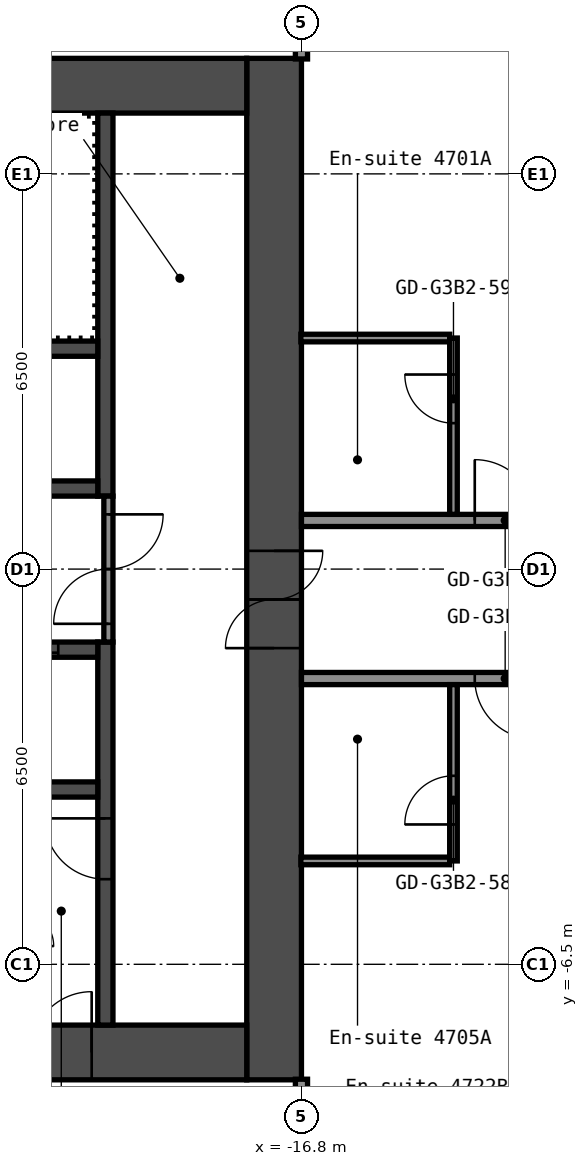
"""IFC4 building model, lengths in metres.
Left out: names, types, materials, properties, quantities, classifications, styles, units other than length and angle.
Written with IfcOpenShell. Run it as: python <this file> out.ifc"""

import sys

from ifc_helpers import new_model, si_unit, direction, frame, frame_2d, origin, place, context, subcontext, project, spatial, rectangle, extrude, element, fill, save


model = new_model("IFC4")
c1 = context("Model", 3, precision=1e-05, world=origin(), true_north=direction((0.0, 1.0)))
c2 = subcontext(c1, "Body", "Model", "MODEL_VIEW")
j1 = project(units=[si_unit("LENGTHUNIT", "METRE"), si_unit("PLANEANGLEUNIT", "RADIAN")], contexts=[c1])
p1 = place(None, origin())
s1 = spatial("IfcSite", under=j1, at=p1, CompositionType="ELEMENT")
p2 = place(p1, origin())
s2 = spatial("IfcBuilding", under=s1, at=p2, CompositionType="ELEMENT")
p3 = place(p2, frame((0.0, 0.0, 166.2)))
s3 = spatial("IfcBuildingStorey", under=s2, at=p3, CompositionType="ELEMENT", Elevation=166.2)
p4 = place(p3, frame((-17.25, -8.4, 0.0), z_axis=(0.0, 0.0, 1.0), x_axis=(0.0, 1.0, 0.0)))
e1 = element("IfcWall", 1, at=p4, inside=s3, PredefinedType="SHEAR", context=c2, shape_type="SweptSolid", body=[
    extrude(rectangle(XDim=16.8, YDim=0.9, at=frame_2d((8.4, 0.0))), origin(), (0.0, 0.0, 1.0), 2.75),
])
p5 = place(p4, frame((7.1, 0.0, 0.0)))
e2 = element("IfcOpeningElement", 2, at=p5, cuts=e1, PredefinedType="OPENING", context=c2, shape_type="SweptSolid", body=[
    extrude(rectangle(XDim=1.6, YDim=2.1, at=frame_2d((0.8, 1.05))), frame((0.0, 0.46, 0.0), z_axis=(0.0, -1.0, 0.0), x_axis=(1.0, 0.0, 0.0)), (0.0, 0.0, 1.0), 0.92),
])
p6 = place(p3, frame((-32.7, 7.95, 0.0), z_axis=(0.0, 0.0, 1.0), x_axis=(1.0, 0.0, 0.0)))
e3 = element("IfcWall", 3, at=p6, inside=s3, PredefinedType="SHEAR", context=c2, shape_type="SweptSolid", body=[
    extrude(rectangle(XDim=15.0, YDim=0.9, at=frame_2d((7.5, 0.0))), origin(), (0.0, 0.0, 1.0), 2.75),
])
p7 = place(p6, frame((3.4, 0.0, 0.0)))
e4 = element("IfcOpeningElement", 4, at=p7, cuts=e3, PredefinedType="OPENING", context=c2, shape_type="SweptSolid", body=[
    extrude(rectangle(XDim=1.2, YDim=2.1, at=frame_2d((0.6, 1.05))), frame((0.0, 0.46, 0.0), z_axis=(0.0, -1.0, 0.0), x_axis=(1.0, 0.0, 0.0)), (0.0, 0.0, 1.0), 0.92),
])
p8 = place(p6, frame((0.75, 0.0, 0.0)))
e5 = element("IfcOpeningElement", 5, at=p8, cuts=e3, PredefinedType="OPENING", context=c2, shape_type="SweptSolid", body=[
    extrude(rectangle(XDim=0.9, YDim=2.1, at=frame_2d((0.45, 1.05))), frame((0.0, 0.46, 0.0), z_axis=(0.0, -1.0, 0.0), x_axis=(1.0, 0.0, 0.0)), (0.0, 0.0, 1.0), 0.92),
])
p9 = place(p3, frame((-32.7, -7.95, 0.0), z_axis=(0.0, 0.0, 1.0), x_axis=(1.0, 0.0, 0.0)))
e6 = element("IfcWall", 6, at=p9, inside=s3, PredefinedType="SHEAR", context=c2, shape_type="SweptSolid", body=[
    extrude(rectangle(XDim=15.0, YDim=0.9, at=frame_2d((7.5, 0.0))), origin(), (0.0, 0.0, 1.0), 2.75),
])
p10 = place(p9, frame((11.45, 0.0, 0.0)))
e7 = element("IfcOpeningElement", 7, at=p10, cuts=e6, PredefinedType="OPENING", context=c2, shape_type="SweptSolid", body=[
    extrude(rectangle(XDim=1.0, YDim=2.1, at=frame_2d((0.5, 1.05))), frame((0.0, 0.46, 0.0), z_axis=(0.0, -1.0, 0.0), x_axis=(1.0, 0.0, 0.0)), (0.0, 0.0, 1.0), 0.92),
])
p11 = place(p3, frame((-20.025, 1.2, 0.0), z_axis=(0.0, 0.0, 1.0), x_axis=(0.0, 1.0, 0.0)))
e8 = element("IfcWall", 8, at=p11, inside=s3, PredefinedType="SHEAR", context=c2, shape_type="SweptSolid", body=[
    extrude(rectangle(XDim=6.3, YDim=0.25, at=frame_2d((3.15, 0.0))), origin(), (0.0, 0.0, 1.0), 2.75),
])
p12 = place(p3, frame((-20.025, -7.5, 0.0), z_axis=(0.0, 0.0, 1.0), x_axis=(0.0, 1.0, 0.0)))
e9 = element("IfcWall", 9, at=p12, inside=s3, PredefinedType="SHEAR", context=c2, shape_type="SweptSolid", body=[
    extrude(rectangle(XDim=6.3, YDim=0.25, at=frame_2d((3.15, 0.0))), origin(), (0.0, 0.0, 1.0), 2.75),
])
p13 = place(p12, frame((2.4, 0.0, 0.0)))
e10 = element("IfcOpeningElement", 10, at=p13, cuts=e9, PredefinedType="OPENING", context=c2, shape_type="SweptSolid", body=[
    extrude(rectangle(XDim=1.0, YDim=2.1, at=frame_2d((0.5, 1.05))), frame((0.0, 0.135, 0.0), z_axis=(0.0, -1.0, 0.0), x_axis=(1.0, 0.0, 0.0)), (0.0, 0.0, 1.0), 0.27),
])
p14 = place(p3, frame((-27.65, 1.325, 0.0), z_axis=(0.0, 0.0, 1.0), x_axis=(1.0, 0.0, 0.0)))
e11 = element("IfcWall", 11, at=p14, inside=s3, PredefinedType="SHEAR", context=c2, shape_type="SweptSolid", body=[
    extrude(rectangle(XDim=7.5, YDim=0.25, at=frame_2d((3.75, 0.0))), origin(), (0.0, 0.0, 1.0), 2.75),
])
p15 = place(p14, frame((4.363, 0.0, 0.0)))
e12 = element("IfcOpeningElement", 12, at=p15, cuts=e11, PredefinedType="OPENING", context=c2, shape_type="SweptSolid", body=[
    extrude(rectangle(XDim=0.9, YDim=2.1, at=frame_2d((0.45, 1.05))), frame((0.0, 0.135, 0.0), z_axis=(0.0, -1.0, 0.0), x_axis=(1.0, 0.0, 0.0)), (0.0, 0.0, 1.0), 0.27),
])
p16 = place(p14, frame((0.663, 0.0, 0.0)))
e13 = element("IfcOpeningElement", 13, at=p16, cuts=e11, PredefinedType="OPENING", context=c2, shape_type="SweptSolid", body=[
    extrude(rectangle(XDim=0.9, YDim=2.1, at=frame_2d((0.45, 1.05))), frame((0.0, 0.135, 0.0), z_axis=(0.0, -1.0, 0.0), x_axis=(1.0, 0.0, 0.0)), (0.0, 0.0, 1.0), 0.27),
])
p17 = place(p3, frame((-27.65, 3.625, 0.0), z_axis=(0.0, 0.0, 1.0), x_axis=(1.0, 0.0, 0.0)))
e14 = element("IfcWall", 14, at=p17, inside=s3, PredefinedType="SHEAR", context=c2, shape_type="SweptSolid", body=[
    extrude(rectangle(XDim=7.5, YDim=0.25, at=frame_2d((3.75, 0.0))), origin(), (0.0, 0.0, 1.0), 2.75),
])
p18 = place(p3, frame((-27.65, -1.325, 0.0), z_axis=(0.0, 0.0, 1.0), x_axis=(1.0, 0.0, 0.0)))
e15 = element("IfcWall", 15, at=p18, inside=s3, PredefinedType="SHEAR", context=c2, shape_type="SweptSolid", body=[
    extrude(rectangle(XDim=7.5, YDim=0.25, at=frame_2d((3.75, 0.0))), origin(), (0.0, 0.0, 1.0), 2.75),
])
p19 = place(p18, frame((5.75, 0.0, 0.0)))
e16 = element("IfcOpeningElement", 16, at=p19, cuts=e15, PredefinedType="OPENING", context=c2, shape_type="SweptSolid", body=[
    extrude(rectangle(XDim=1.1, YDim=2.1, at=frame_2d((0.55, 1.05))), frame((0.0, 0.135, 0.0), z_axis=(0.0, -1.0, 0.0), x_axis=(1.0, 0.0, 0.0)), (0.0, 0.0, 1.0), 0.27),
])
p20 = place(p18, frame((3.35, 0.0, 0.0)))
e17 = element("IfcOpeningElement", 17, at=p20, cuts=e15, PredefinedType="OPENING", context=c2, shape_type="SweptSolid", body=[
    extrude(rectangle(XDim=1.1, YDim=2.1, at=frame_2d((0.55, 1.05))), frame((0.0, 0.135, 0.0), z_axis=(0.0, -1.0, 0.0), x_axis=(1.0, 0.0, 0.0)), (0.0, 0.0, 1.0), 0.27),
])
p21 = place(p18, frame((0.95, 0.0, 0.0)))
e18 = element("IfcOpeningElement", 18, at=p21, cuts=e15, PredefinedType="OPENING", context=c2, shape_type="SweptSolid", body=[
    extrude(rectangle(XDim=1.1, YDim=2.1, at=frame_2d((0.55, 1.05))), frame((0.0, 0.135, 0.0), z_axis=(0.0, -1.0, 0.0), x_axis=(1.0, 0.0, 0.0)), (0.0, 0.0, 1.0), 0.27),
])
p22 = place(p3, frame((-27.65, -3.625, 0.0), z_axis=(0.0, 0.0, 1.0), x_axis=(1.0, 0.0, 0.0)))
e19 = element("IfcWall", 19, at=p22, inside=s3, PredefinedType="SHEAR", context=c2, shape_type="SweptSolid", body=[
    extrude(rectangle(XDim=7.5, YDim=0.25, at=frame_2d((3.75, 0.0))), origin(), (0.0, 0.0, 1.0), 2.75),
])
p23 = place(p3, frame((-19.975, -1.2, 0.0), z_axis=(0.0, 0.0, 1.0), x_axis=(0.0, 1.0, 0.0)))
e20 = element("IfcWall", 20, at=p23, inside=s3, PredefinedType="PARTITIONING", context=c2, shape_type="SweptSolid", body=[
    extrude(rectangle(XDim=2.4, YDim=0.15, at=frame_2d((1.2, 0.0))), origin(), (0.0, 0.0, 1.0), 2.75),
])
p24 = place(p23, frame((0.3, 0.0, 0.0)))
e21 = element("IfcOpeningElement", 21, at=p24, cuts=e20, PredefinedType="OPENING", context=c2, shape_type="SweptSolid", body=[
    extrude(rectangle(XDim=1.8, YDim=2.1, at=frame_2d((0.9, 1.05))), frame((0.0, 0.085, 0.0), z_axis=(0.0, -1.0, 0.0), x_axis=(1.0, 0.0, 0.0)), (0.0, 0.0, 1.0), 0.17),
])
p25 = place(p3, frame((-16.81, -4.8, 0.0), z_axis=(0.0, 0.0, 1.0), x_axis=(1.0, 0.0, 0.0)))
e22 = element("IfcWall", 22, at=p25, inside=s3, PredefinedType="PARTITIONING", context=c2, shape_type="SweptSolid", body=[
    extrude(rectangle(XDim=2.448, YDim=0.125, at=frame_2d((1.224, 0.0))), origin(), (0.0, 0.0, 1.0), 2.75),
])
p26 = place(p3, frame((-16.8, -1.8, 0.0), z_axis=(0.0, 0.0, 1.0), x_axis=(1.0, 0.0, 0.0)))
e23 = element("IfcWall", 23, at=p26, inside=s3, PredefinedType="PARTITIONING", context=c2, shape_type="SweptSolid", body=[
    extrude(rectangle(XDim=33.6, YDim=0.2, at=frame_2d((16.8, 0.0))), origin(), (0.0, 0.0, 1.0), 2.75),
])
p27 = place(p26, frame((2.85, 0.0, 0.0)))
e24 = element("IfcOpeningElement", 24, at=p27, cuts=e23, PredefinedType="OPENING", context=c2, shape_type="SweptSolid", body=[
    extrude(rectangle(XDim=1.0, YDim=2.1, at=frame_2d((0.5, 1.05))), frame((0.0, 0.11, 0.0), z_axis=(0.0, -1.0, 0.0), x_axis=(1.0, 0.0, 0.0)), (0.0, 0.0, 1.0), 0.22),
])
p28 = place(p26, frame((4.55, 0.0, 0.0)))
e25 = element("IfcOpeningElement", 25, at=p28, cuts=e23, PredefinedType="OPENING", context=c2, shape_type="SweptSolid", body=[
    extrude(rectangle(XDim=1.0, YDim=2.1, at=frame_2d((0.5, 1.05))), frame((0.0, 0.11, 0.0), z_axis=(0.0, -1.0, 0.0), x_axis=(1.0, 0.0, 0.0)), (0.0, 0.0, 1.0), 0.22),
])
p29 = place(p26, frame((11.25, 0.0, 0.0)))
e26 = element("IfcOpeningElement", 26, at=p29, cuts=e23, PredefinedType="OPENING", context=c2, shape_type="SweptSolid", body=[
    extrude(rectangle(XDim=1.0, YDim=2.1, at=frame_2d((0.5, 1.05))), frame((0.0, 0.11, 0.0), z_axis=(0.0, -1.0, 0.0), x_axis=(1.0, 0.0, 0.0)), (0.0, 0.0, 1.0), 0.22),
])
p30 = place(p26, frame((12.95, 0.0, 0.0)))
e27 = element("IfcOpeningElement", 27, at=p30, cuts=e23, PredefinedType="OPENING", context=c2, shape_type="SweptSolid", body=[
    extrude(rectangle(XDim=1.0, YDim=2.1, at=frame_2d((0.5, 1.05))), frame((0.0, 0.11, 0.0), z_axis=(0.0, -1.0, 0.0), x_axis=(1.0, 0.0, 0.0)), (0.0, 0.0, 1.0), 0.22),
])
p31 = place(p26, frame((17.86, 0.0, 0.0)))
e28 = element("IfcOpeningElement", 28, at=p31, cuts=e23, PredefinedType="OPENING", context=c2, shape_type="SweptSolid", body=[
    extrude(rectangle(XDim=0.9, YDim=2.1, at=frame_2d((0.45, 1.05))), frame((0.0, 0.11, 0.0), z_axis=(0.0, -1.0, 0.0), x_axis=(1.0, 0.0, 0.0)), (0.0, 0.0, 1.0), 0.22),
])
p32 = place(p26, frame((22.06, 0.0, 0.0)))
e29 = element("IfcOpeningElement", 29, at=p32, cuts=e23, PredefinedType="OPENING", context=c2, shape_type="SweptSolid", body=[
    extrude(rectangle(XDim=0.9, YDim=2.1, at=frame_2d((0.45, 1.05))), frame((0.0, 0.11, 0.0), z_axis=(0.0, -1.0, 0.0), x_axis=(1.0, 0.0, 0.0)), (0.0, 0.0, 1.0), 0.22),
])
p33 = place(p26, frame((28.05, 0.0, 0.0)))
e30 = element("IfcOpeningElement", 30, at=p33, cuts=e23, PredefinedType="OPENING", context=c2, shape_type="SweptSolid", body=[
    extrude(rectangle(XDim=1.0, YDim=2.1, at=frame_2d((0.5, 1.05))), frame((0.0, 0.11, 0.0), z_axis=(0.0, -1.0, 0.0), x_axis=(1.0, 0.0, 0.0)), (0.0, 0.0, 1.0), 0.22),
])
p34 = place(p26, frame((29.75, 0.0, 0.0)))
e31 = element("IfcOpeningElement", 31, at=p34, cuts=e23, PredefinedType="OPENING", context=c2, shape_type="SweptSolid", body=[
    extrude(rectangle(XDim=1.0, YDim=2.1, at=frame_2d((0.5, 1.05))), frame((0.0, 0.11, 0.0), z_axis=(0.0, -1.0, 0.0), x_axis=(1.0, 0.0, 0.0)), (0.0, 0.0, 1.0), 0.22),
])
p35 = place(p3, frame((-16.8, 0.8, 0.0), z_axis=(0.0, 0.0, 1.0), x_axis=(1.0, 0.0, 0.0)))
e32 = element("IfcWall", 32, at=p35, inside=s3, PredefinedType="PARTITIONING", context=c2, shape_type="SweptSolid", body=[
    extrude(rectangle(XDim=33.6, YDim=0.2, at=frame_2d((16.8, 0.0))), origin(), (0.0, 0.0, 1.0), 2.75),
])
p36 = place(p35, frame((2.85, 0.0, 0.0)))
e33 = element("IfcOpeningElement", 33, at=p36, cuts=e32, PredefinedType="OPENING", context=c2, shape_type="SweptSolid", body=[
    extrude(rectangle(XDim=1.0, YDim=2.1, at=frame_2d((0.5, 1.05))), frame((0.0, 0.11, 0.0), z_axis=(0.0, -1.0, 0.0), x_axis=(1.0, 0.0, 0.0)), (0.0, 0.0, 1.0), 0.22),
])
p37 = place(p35, frame((4.55, 0.0, 0.0)))
e34 = element("IfcOpeningElement", 34, at=p37, cuts=e32, PredefinedType="OPENING", context=c2, shape_type="SweptSolid", body=[
    extrude(rectangle(XDim=1.0, YDim=2.1, at=frame_2d((0.5, 1.05))), frame((0.0, 0.11, 0.0), z_axis=(0.0, -1.0, 0.0), x_axis=(1.0, 0.0, 0.0)), (0.0, 0.0, 1.0), 0.22),
])
p38 = place(p35, frame((9.63, 0.0, 0.0)))
e35 = element("IfcOpeningElement", 35, at=p38, cuts=e32, PredefinedType="OPENING", context=c2, shape_type="SweptSolid", body=[
    extrude(rectangle(XDim=0.9, YDim=2.1, at=frame_2d((0.45, 1.05))), frame((0.0, 0.11, 0.0), z_axis=(0.0, -1.0, 0.0), x_axis=(1.0, 0.0, 0.0)), (0.0, 0.0, 1.0), 0.22),
])
p39 = place(p35, frame((13.83, 0.0, 0.0)))
e36 = element("IfcOpeningElement", 36, at=p39, cuts=e32, PredefinedType="OPENING", context=c2, shape_type="SweptSolid", body=[
    extrude(rectangle(XDim=0.9, YDim=2.1, at=frame_2d((0.45, 1.05))), frame((0.0, 0.11, 0.0), z_axis=(0.0, -1.0, 0.0), x_axis=(1.0, 0.0, 0.0)), (0.0, 0.0, 1.0), 0.22),
])
p40 = place(p35, frame((19.65, 0.0, 0.0)))
e37 = element("IfcOpeningElement", 37, at=p40, cuts=e32, PredefinedType="OPENING", context=c2, shape_type="SweptSolid", body=[
    extrude(rectangle(XDim=1.0, YDim=2.1, at=frame_2d((0.5, 1.05))), frame((0.0, 0.11, 0.0), z_axis=(0.0, -1.0, 0.0), x_axis=(1.0, 0.0, 0.0)), (0.0, 0.0, 1.0), 0.22),
])
p41 = place(p35, frame((21.35, 0.0, 0.0)))
e38 = element("IfcOpeningElement", 38, at=p41, cuts=e32, PredefinedType="OPENING", context=c2, shape_type="SweptSolid", body=[
    extrude(rectangle(XDim=1.0, YDim=2.1, at=frame_2d((0.5, 1.05))), frame((0.0, 0.11, 0.0), z_axis=(0.0, -1.0, 0.0), x_axis=(1.0, 0.0, 0.0)), (0.0, 0.0, 1.0), 0.22),
])
p42 = place(p35, frame((28.05, 0.0, 0.0)))
e39 = element("IfcOpeningElement", 39, at=p42, cuts=e32, PredefinedType="OPENING", context=c2, shape_type="SweptSolid", body=[
    extrude(rectangle(XDim=1.0, YDim=2.1, at=frame_2d((0.5, 1.05))), frame((0.0, 0.11, 0.0), z_axis=(0.0, -1.0, 0.0), x_axis=(1.0, 0.0, 0.0)), (0.0, 0.0, 1.0), 0.22),
])
p43 = place(p35, frame((29.75, 0.0, 0.0)))
e40 = element("IfcOpeningElement", 40, at=p43, cuts=e32, PredefinedType="OPENING", context=c2, shape_type="SweptSolid", body=[
    extrude(rectangle(XDim=1.0, YDim=2.1, at=frame_2d((0.5, 1.05))), frame((0.0, 0.11, 0.0), z_axis=(0.0, -1.0, 0.0), x_axis=(1.0, 0.0, 0.0)), (0.0, 0.0, 1.0), 0.22),
])
p44 = place(p3, frame((-16.81, 3.8, 0.0), z_axis=(0.0, 0.0, 1.0), x_axis=(1.0, 0.0, 0.0)))
e41 = element("IfcWall", 41, at=p44, inside=s3, PredefinedType="PARTITIONING", context=c2, shape_type="SweptSolid", body=[
    extrude(rectangle(XDim=2.448, YDim=0.125, at=frame_2d((1.224, 0.0))), origin(), (0.0, 0.0, 1.0), 2.75),
])
p45 = place(p3, frame((-16.8, -19.3, 0.0), z_axis=(0.0, 0.0, 1.0), x_axis=(0.0, 1.0, 0.0)))
e42 = element("IfcWall", 42, at=p45, inside=s3, PredefinedType="PARTITIONING", context=c2, shape_type="SweptSolid", body=[
    extrude(rectangle(XDim=10.91, YDim=0.2, at=frame_2d((5.455, 0.0))), origin(), (0.0, 0.0, 1.0), 2.75),
])
p46 = place(p3, frame((-16.8, 8.39, 0.0), z_axis=(0.0, 0.0, 1.0), x_axis=(0.0, 1.0, 0.0)))
e43 = element("IfcWall", 43, at=p46, inside=s3, PredefinedType="PARTITIONING", context=c2, shape_type="SweptSolid", body=[
    extrude(rectangle(XDim=9.91, YDim=0.2, at=frame_2d((4.955, 0.0))), origin(), (0.0, 0.0, 1.0), 2.75),
])
p47 = place(p3, frame((-14.3, -4.8, 0.0), z_axis=(0.0, 0.0, 1.0), x_axis=(0.0, 1.0, 0.0)))
e44 = element("IfcWall", 44, at=p47, inside=s3, PredefinedType="PARTITIONING", context=c2, shape_type="SweptSolid", body=[
    extrude(rectangle(XDim=2.9, YDim=0.125, at=frame_2d((1.45, 0.0))), origin(), (0.0, 0.0, 1.0), 2.75),
])
p48 = place(p47, frame((0.6, 0.0, 0.0)))
e45 = element("IfcOpeningElement", 45, at=p48, cuts=e44, PredefinedType="OPENING", context=c2, shape_type="SweptSolid", body=[
    extrude(rectangle(XDim=0.8, YDim=2.1, at=frame_2d((0.4, 1.05))), frame((0.0, 0.073, 0.0), z_axis=(0.0, -1.0, 0.0), x_axis=(1.0, 0.0, 0.0)), (0.0, 0.0, 1.0), 0.145),
])
p49 = place(p3, frame((-14.3, 0.9, 0.0), z_axis=(0.0, 0.0, 1.0), x_axis=(0.0, 1.0, 0.0)))
e46 = element("IfcWall", 46, at=p49, inside=s3, PredefinedType="PARTITIONING", context=c2, shape_type="SweptSolid", body=[
    extrude(rectangle(XDim=2.9, YDim=0.125, at=frame_2d((1.45, 0.0))), origin(), (0.0, 0.0, 1.0), 2.75),
])
p50 = place(p49, frame((1.5, 0.0, 0.0)))
e47 = element("IfcOpeningElement", 47, at=p50, cuts=e46, PredefinedType="OPENING", context=c2, shape_type="SweptSolid", body=[
    extrude(rectangle(XDim=0.8, YDim=2.1, at=frame_2d((0.4, 1.05))), frame((0.0, 0.073, 0.0), z_axis=(0.0, -1.0, 0.0), x_axis=(1.0, 0.0, 0.0)), (0.0, 0.0, 1.0), 0.145),
])
p51 = place(p5, origin())
e48 = element("IfcDoor", 48, at=p51, inside=s3, OperationType="DOUBLE_DOOR_SINGLE_SWING", PredefinedType="DOOR", context=c2, shape_type="SweptSolid", body=[
    extrude(rectangle(XDim=1.6, YDim=2.1, at=frame_2d((0.8, 1.05))), frame((0.0, 0.025, 0.0), z_axis=(0.0, -1.0, 0.0), x_axis=(1.0, 0.0, 0.0)), (0.0, 0.0, 1.0), 0.05),
])
fill(e2, e48)
p52 = place(p10, origin())
e49 = element("IfcDoor", 49, at=p52, inside=s3, OperationType="SINGLE_SWING_LEFT", PredefinedType="DOOR", context=c2, shape_type="SweptSolid", body=[
    extrude(rectangle(XDim=1.0, YDim=2.1, at=frame_2d((0.5, 1.05))), frame((0.0, 0.025, 0.0), z_axis=(0.0, -1.0, 0.0), x_axis=(1.0, 0.0, 0.0)), (0.0, 0.0, 1.0), 0.05),
])
fill(e7, e49)
p53 = place(p13, origin())
e50 = element("IfcDoor", 50, at=p53, inside=s3, OperationType="SINGLE_SWING_LEFT", PredefinedType="DOOR", context=c2, shape_type="SweptSolid", body=[
    extrude(rectangle(XDim=1.0, YDim=2.1, at=frame_2d((0.5, 1.05))), frame((0.0, 0.025, 0.0), z_axis=(0.0, -1.0, 0.0), x_axis=(1.0, 0.0, 0.0)), (0.0, 0.0, 1.0), 0.05),
])
fill(e10, e50)
p54 = place(p24, origin())
e51 = element("IfcDoor", 51, at=p54, inside=s3, OperationType="DOUBLE_DOOR_SINGLE_SWING", PredefinedType="DOOR", context=c2, shape_type="SweptSolid", body=[
    extrude(rectangle(XDim=1.8, YDim=2.1, at=frame_2d((0.9, 1.05))), frame((0.0, 0.025, 0.0), z_axis=(0.0, -1.0, 0.0), x_axis=(1.0, 0.0, 0.0)), (0.0, 0.0, 1.0), 0.05),
])
fill(e21, e51)
p55 = place(p19, origin())
e52 = element("IfcDoor", 52, at=p55, inside=s3, OperationType="DOUBLE_DOOR_SLIDING", PredefinedType="DOOR", context=c2, shape_type="SweptSolid", body=[
    extrude(rectangle(XDim=1.1, YDim=2.1, at=frame_2d((0.55, 1.05))), frame((0.0, 0.025, 0.0), z_axis=(0.0, -1.0, 0.0), x_axis=(1.0, 0.0, 0.0)), (0.0, 0.0, 1.0), 0.05),
])
fill(e16, e52)
p56 = place(p27, origin())
e53 = element("IfcDoor", 53, at=p56, inside=s3, OperationType="SINGLE_SWING_RIGHT", PredefinedType="DOOR", context=c2, shape_type="SweptSolid", body=[
    extrude(rectangle(XDim=1.0, YDim=2.1, at=frame_2d((0.5, 1.05))), frame((0.0, 0.025, 0.0), z_axis=(0.0, -1.0, 0.0), x_axis=(1.0, 0.0, 0.0)), (0.0, 0.0, 1.0), 0.05),
])
fill(e24, e53)
p57 = place(p36, origin())
e54 = element("IfcDoor", 54, at=p57, inside=s3, OperationType="SINGLE_SWING_RIGHT", PredefinedType="DOOR", context=c2, shape_type="SweptSolid", body=[
    extrude(rectangle(XDim=1.0, YDim=2.1, at=frame_2d((0.5, 1.05))), frame((0.0, 0.025, 0.0), z_axis=(0.0, -1.0, 0.0), x_axis=(1.0, 0.0, 0.0)), (0.0, 0.0, 1.0), 0.05),
])
fill(e33, e54)
p58 = place(p48, origin())
e55 = element("IfcDoor", 55, at=p58, inside=s3, OperationType="SINGLE_SWING_RIGHT", PredefinedType="DOOR", context=c2, shape_type="SweptSolid", body=[
    extrude(rectangle(XDim=0.8, YDim=2.1, at=frame_2d((0.4, 1.05))), frame((0.0, 0.025, 0.0), z_axis=(0.0, -1.0, 0.0), x_axis=(1.0, 0.0, 0.0)), (0.0, 0.0, 1.0), 0.05),
])
fill(e45, e55)
p59 = place(p50, origin())
e56 = element("IfcDoor", 56, at=p59, inside=s3, OperationType="SINGLE_SWING_LEFT", PredefinedType="DOOR", context=c2, shape_type="SweptSolid", body=[
    extrude(rectangle(XDim=0.8, YDim=2.1, at=frame_2d((0.4, 1.05))), frame((0.0, 0.025, 0.0), z_axis=(0.0, -1.0, 0.0), x_axis=(1.0, 0.0, 0.0)), (0.0, 0.0, 1.0), 0.05),
])
fill(e47, e56)
save(model, sys.argv[1])
